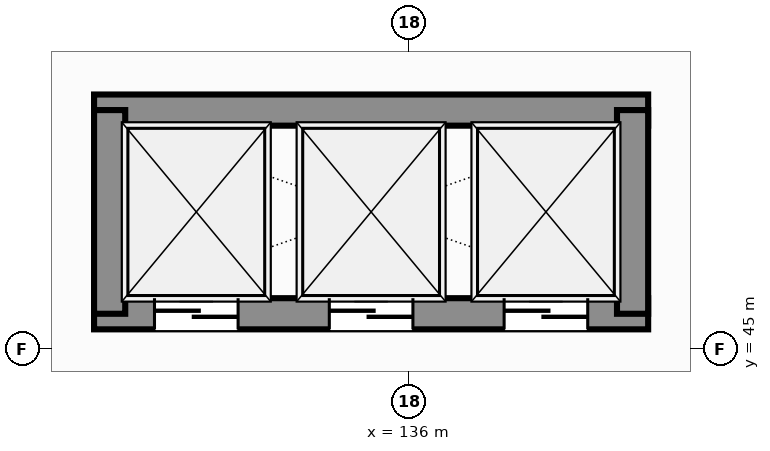
"""IFC4 building model, lengths in metres.
Left out: names, types, materials, properties, quantities, classifications, styles, units other than length and angle.
Written with IfcOpenShell. Run it as: python <this file> out.ifc"""

import sys

from ifc_helpers import new_model, si_unit, direction, frame, frame_2d, origin, place, context, subcontext, project, spatial, rectangle, extrude, element, fill, save


model = new_model("IFC4")
c1 = context("Model", 3, precision=1e-05, world=origin(), true_north=direction((0.0, 1.0)))
c2 = subcontext(c1, "Body", "Model", "MODEL_VIEW")
j1 = project(units=[si_unit("LENGTHUNIT", "METRE"), si_unit("PLANEANGLEUNIT", "RADIAN")], contexts=[c1])
p1 = place(None, origin())
s1 = spatial("IfcSite", under=j1, at=p1, CompositionType="ELEMENT")
p2 = place(p1, origin())
s2 = spatial("IfcBuilding", under=s1, at=p2, CompositionType="ELEMENT")
p3 = place(p2, frame((0.0, 0.0, 11.4)))
s3 = spatial("IfcBuildingStorey", under=s2, at=p3, CompositionType="ELEMENT", Elevation=11.4)
p4 = place(p3, frame((131.855, 45.46, 0.0), z_axis=(0.0, 0.0, 1.0), x_axis=(1.0, 0.0, 0.0)))
e1 = element("IfcWall", 1, at=p4, inside=s3, PredefinedType="SHEAR", context=c2, shape_type="SweptSolid", body=[
    extrude(rectangle(XDim=7.29, YDim=0.41, at=frame_2d((3.645, 0.0))), origin(), (0.0, 0.0, 1.0), 4.8),
])
p5 = place(p4, frame((0.795, 0.0, 0.0)))
e2 = element("IfcOpeningElement", 2, at=p5, cuts=e1, PredefinedType="OPENING", context=c2, shape_type="SweptSolid", body=[
    extrude(rectangle(XDim=1.1, YDim=2.2, at=frame_2d((0.55, 1.1))), frame((0.0, 0.215, 0.0), z_axis=(0.0, -1.0, 0.0), x_axis=(1.0, 0.0, 0.0)), (0.0, 0.0, 1.0), 0.43),
])
p6 = place(p4, frame((3.095, 0.0, 0.0)))
e3 = element("IfcOpeningElement", 3, at=p6, cuts=e1, PredefinedType="OPENING", context=c2, shape_type="SweptSolid", body=[
    extrude(rectangle(XDim=1.1, YDim=2.2, at=frame_2d((0.55, 1.1))), frame((0.0, 0.215, 0.0), z_axis=(0.0, -1.0, 0.0), x_axis=(1.0, 0.0, 0.0)), (0.0, 0.0, 1.0), 0.43),
])
p7 = place(p4, frame((5.395, 0.0, 0.0)))
e4 = element("IfcOpeningElement", 4, at=p7, cuts=e1, PredefinedType="OPENING", context=c2, shape_type="SweptSolid", body=[
    extrude(rectangle(XDim=1.1, YDim=2.2, at=frame_2d((0.55, 1.1))), frame((0.0, 0.215, 0.0), z_axis=(0.0, -1.0, 0.0), x_axis=(1.0, 0.0, 0.0)), (0.0, 0.0, 1.0), 0.43),
])
p8 = place(p3, frame((131.855, 48.14, 0.0), z_axis=(0.0, 0.0, 1.0), x_axis=(1.0, 0.0, 0.0)))
e5 = element("IfcWall", 5, at=p8, inside=s3, PredefinedType="SHEAR", context=c2, shape_type="SweptSolid", body=[
    extrude(rectangle(XDim=7.29, YDim=0.41, at=frame_2d((3.645, 0.0))), origin(), (0.0, 0.0, 1.0), 4.8),
])
for number, where, z_axis, x_axis in (
    (6, (132.06, 45.46, 0.0), (0.0, 0.0, 1.0), (0.0, 1.0, 0.0)),
    (7, (138.94, 45.46, 0.0), (0.0, 0.0, 1.0), (0.0, 1.0, 0.0)),
):
    element("IfcWall", number, at=place(p3, frame(where, z_axis=z_axis, x_axis=x_axis)), inside=s3, PredefinedType="SHEAR", context=c2, shape_type="SweptSolid", body=[
        extrude(rectangle(XDim=2.68, YDim=0.41, at=frame_2d((1.34, 0.0))), origin(), (0.0, 0.0, 1.0), 4.8),
    ])
p9 = place(p5, origin())
e8 = element("IfcDoor", 8, at=p9, inside=s3, OperationType="DOUBLE_DOOR_SLIDING", PredefinedType="DOOR", context=c2, shape_type="SweptSolid", body=[
    extrude(rectangle(XDim=1.1, YDim=2.2, at=frame_2d((0.55, 1.1))), frame((0.0, 0.025, 0.0), z_axis=(0.0, -1.0, 0.0), x_axis=(1.0, 0.0, 0.0)), (0.0, 0.0, 1.0), 0.05),
])
fill(e2, e8)
p10 = place(p6, origin())
e9 = element("IfcDoor", 9, at=p10, inside=s3, OperationType="DOUBLE_DOOR_SLIDING", PredefinedType="DOOR", context=c2, shape_type="SweptSolid", body=[
    extrude(rectangle(XDim=1.1, YDim=2.2, at=frame_2d((0.55, 1.1))), frame((0.0, 0.025, 0.0), z_axis=(0.0, -1.0, 0.0), x_axis=(1.0, 0.0, 0.0)), (0.0, 0.0, 1.0), 0.05),
])
fill(e3, e9)
p11 = place(p7, origin())
e10 = element("IfcDoor", 10, at=p11, inside=s3, OperationType="DOUBLE_DOOR_SLIDING", PredefinedType="DOOR", context=c2, shape_type="SweptSolid", body=[
    extrude(rectangle(XDim=1.1, YDim=2.2, at=frame_2d((0.55, 1.1))), frame((0.0, 0.025, 0.0), z_axis=(0.0, -1.0, 0.0), x_axis=(1.0, 0.0, 0.0)), (0.0, 0.0, 1.0), 0.05),
])
fill(e4, e10)
save(model, sys.argv[1])
